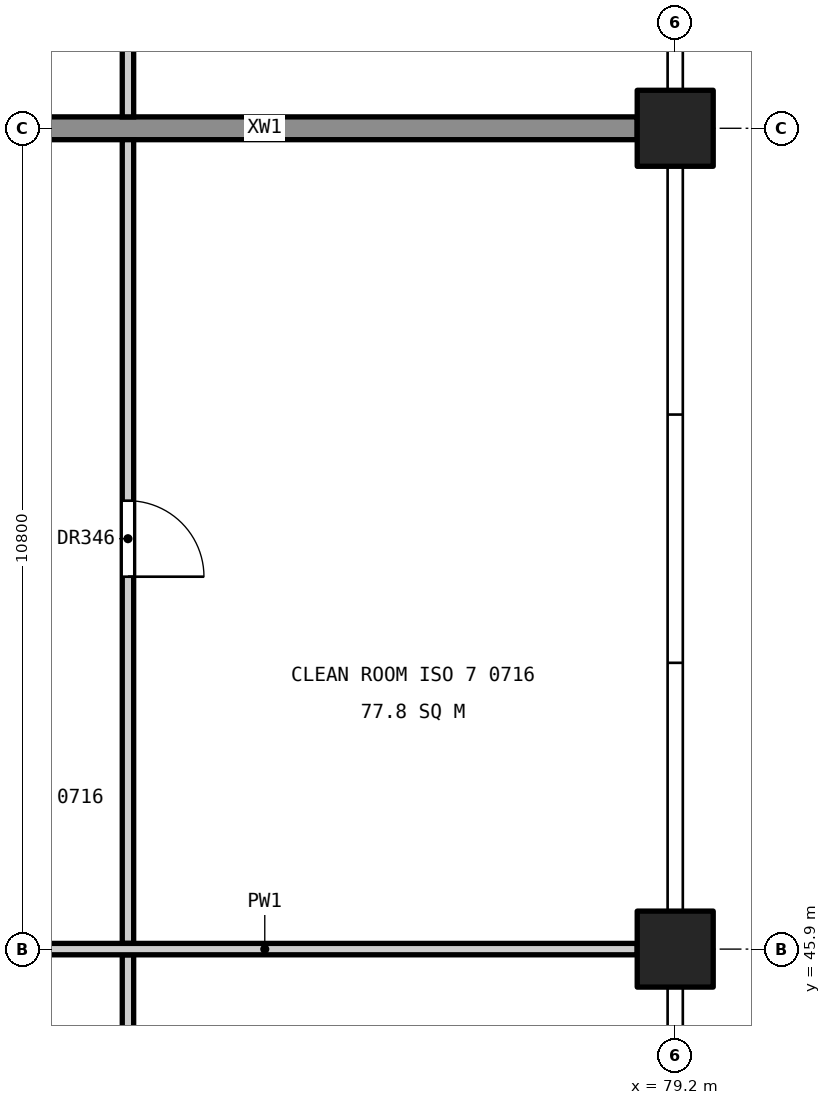
"""IFC4 building model, lengths in metres.
Left out: names, types, materials, properties, quantities, classifications, styles, units other than length and angle.
Written with IfcOpenShell. Run it as: python <this file> out.ifc"""

import sys

from ifc_helpers import new_model, si_unit, direction, frame, frame_2d, origin, origin_2d, place, context, subcontext, project, spatial, rectangle, extrude, element, fill, save


model = new_model("IFC4")
c1 = context("Model", 3, precision=1e-05, world=origin(), true_north=direction((0.0, 1.0)))
c2 = subcontext(c1, "Body", "Model", "MODEL_VIEW")
j1 = project(units=[si_unit("LENGTHUNIT", "METRE"), si_unit("PLANEANGLEUNIT", "RADIAN")], contexts=[c1])
p1 = place(None, origin())
s1 = spatial("IfcSite", under=j1, at=p1, CompositionType="ELEMENT")
p2 = place(p1, origin())
s2 = spatial("IfcBuilding", under=s1, at=p2, CompositionType="ELEMENT")
p3 = place(p2, frame((0.0, 0.0, 36.6)))
s3 = spatial("IfcBuildingStorey", under=s2, at=p3, CompositionType="ELEMENT", Elevation=36.6)
for number, where, z_axis, x_axis in (
    (1, (79.2, 45.9, 0.0), (0.0, 0.0, 1.0), (1.0, 0.0, 0.0)),
    (2, (79.2, 56.7, 0.0), (0.0, 0.0, 1.0), (1.0, 0.0, 0.0)),
):
    element("IfcColumn", number, at=place(p3, frame(where, z_axis=z_axis, x_axis=x_axis)), inside=s3, PredefinedType="COLUMN", context=c2, shape_type="SweptSolid", body=[
        extrude(rectangle(XDim=1.0, YDim=1.0, at=origin_2d()), origin(), (0.0, 0.0, 1.0), 4.8),
    ])
p4 = place(p3, frame((68.9, 56.7, 0.0), z_axis=(0.0, 0.0, 1.0), x_axis=(1.0, 0.0, 0.0)))
e3 = element("IfcWall", 3, at=p4, inside=s3, PredefinedType="SHEAR", context=c2, shape_type="SweptSolid", body=[
    extrude(rectangle(XDim=9.8, YDim=0.3, at=frame_2d((4.9, 0.0))), origin(), (0.0, 0.0, 1.0), 4.55),
])
p5 = place(p3, frame((72.0, 35.25, 0.0), z_axis=(0.0, 0.0, 1.0), x_axis=(0.0, 1.0, 0.0)))
e4 = element("IfcWall", 4, at=p5, inside=s3, PredefinedType="PARTITIONING", context=c2, shape_type="SweptSolid", body=[
    extrude(rectangle(XDim=10.575, YDim=0.15, at=frame_2d((5.288, 0.0))), origin(), (0.0, 0.0, 1.0), 3.55),
])
p6 = place(p5, frame((4.75, 0.0, 0.0)))
e5 = element("IfcOpeningElement", 5, at=p6, cuts=e4, PredefinedType="OPENING", context=c2, shape_type="SweptSolid", body=[
    extrude(rectangle(XDim=1.0, YDim=2.1, at=frame_2d((0.5, 1.05))), frame((0.0, 0.085, 0.0), z_axis=(0.0, -1.0, 0.0), x_axis=(1.0, 0.0, 0.0)), (0.0, 0.0, 1.0), 0.17),
])
p7 = place(p3, frame((72.0, 45.975, 0.0), z_axis=(0.0, 0.0, 1.0), x_axis=(0.0, 1.0, 0.0)))
e6 = element("IfcWall", 6, at=p7, inside=s3, PredefinedType="PARTITIONING", context=c2, shape_type="SweptSolid", body=[
    extrude(rectangle(XDim=10.575, YDim=0.15, at=frame_2d((5.288, 0.0))), origin(), (0.0, 0.0, 1.0), 3.55),
])
p8 = place(p7, frame((4.825, 0.0, 0.0)))
e7 = element("IfcOpeningElement", 7, at=p8, cuts=e6, PredefinedType="OPENING", context=c2, shape_type="SweptSolid", body=[
    extrude(rectangle(XDim=1.0, YDim=2.1, at=frame_2d((0.5, 1.05))), frame((0.0, 0.085, 0.0), z_axis=(0.0, -1.0, 0.0), x_axis=(1.0, 0.0, 0.0)), (0.0, 0.0, 1.0), 0.17),
])
p9 = place(p3, frame((72.0, 56.85, 0.0), z_axis=(0.0, 0.0, 1.0), x_axis=(0.0, 1.0, 0.0)))
e8 = element("IfcWall", 8, at=p9, inside=s3, PredefinedType="PARTITIONING", context=c2, shape_type="SweptSolid", body=[
    extrude(rectangle(XDim=21.3, YDim=0.15, at=frame_2d((10.65, 0.0))), origin(), (0.0, 0.0, 1.0), 3.55),
])
p10 = place(p9, frame((10.15, 0.0, 0.0)))
e9 = element("IfcOpeningElement", 9, at=p10, cuts=e8, PredefinedType="OPENING", context=c2, shape_type="SweptSolid", body=[
    extrude(rectangle(XDim=1.0, YDim=2.1, at=frame_2d((0.5, 1.05))), frame((0.0, 0.085, 0.0), z_axis=(0.0, -1.0, 0.0), x_axis=(1.0, 0.0, 0.0)), (0.0, 0.0, 1.0), 0.17),
])
p11 = place(p3, frame((68.9, 45.9, 0.0), z_axis=(0.0, 0.0, 1.0), x_axis=(1.0, 0.0, 0.0)))
e10 = element("IfcWall", 10, at=p11, inside=s3, PredefinedType="PARTITIONING", context=c2, shape_type="SweptSolid", body=[
    extrude(rectangle(XDim=9.8, YDim=0.15, at=frame_2d((4.9, 0.0))), origin(), (0.0, 0.0, 1.0), 3.85),
])
p12 = place(p8, frame((1.0, 0.0, 0.0), z_axis=(0.0, 0.0, 1.0), x_axis=(-1.0, 0.0, 0.0)))
e11 = element("IfcDoor", 11, at=p12, inside=s3, OperationType="SINGLE_SWING_RIGHT", PredefinedType="DOOR", context=c2, shape_type="SweptSolid", body=[
    extrude(rectangle(XDim=1.0, YDim=2.1, at=frame_2d((0.5, 1.05))), frame((0.0, 0.025, 0.0), z_axis=(0.0, -1.0, 0.0), x_axis=(1.0, 0.0, 0.0)), (0.0, 0.0, 1.0), 0.05),
])
fill(e7, e11)
save(model, sys.argv[1])
